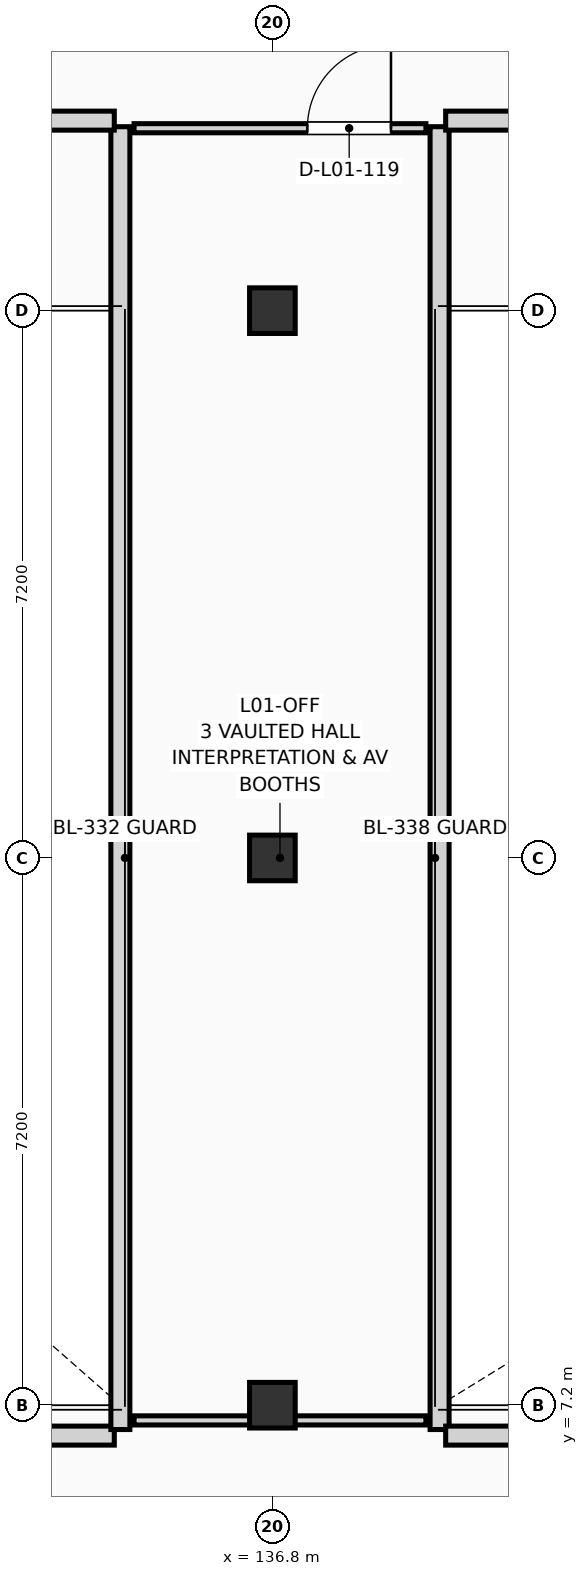
"""IFC4 building model, lengths in metres.
Left out: names, types, materials, properties, quantities, classifications, styles, units other than length and angle.
Written with IfcOpenShell. Run it as: python <this file> out.ifc"""

import sys

from ifc_helpers import new_model, si_unit, direction, frame, frame_2d, origin, origin_2d, place, context, subcontext, project, spatial, rectangle, extrude, element, fill, save


model = new_model("IFC4")
c1 = context("Model", 3, precision=1e-05, world=origin(), true_north=direction((0.0, 1.0)))
c2 = subcontext(c1, "Body", "Model", "MODEL_VIEW")
j1 = project(units=[si_unit("LENGTHUNIT", "METRE"), si_unit("PLANEANGLEUNIT", "RADIAN")], contexts=[c1])
p1 = place(None, origin())
s1 = spatial("IfcSite", under=j1, at=p1, CompositionType="ELEMENT")
p2 = place(p1, origin())
s2 = spatial("IfcBuilding", under=s1, at=p2, CompositionType="ELEMENT")
p3 = place(p2, frame((0.0, 0.0, 4.5)))
s3 = spatial("IfcBuildingStorey", under=s2, at=p3, CompositionType="ELEMENT", Elevation=4.5)
for number, where, z_axis, x_axis in (
    (1, (136.8, 7.2, 0.0), (0.0, 0.0, 1.0), (1.0, 0.0, 0.0)),
    (2, (136.8, 14.4, 0.0), (0.0, 0.0, 1.0), (1.0, 0.0, 0.0)),
    (3, (136.8, 21.6, 0.0), (0.0, 0.0, 1.0), (1.0, 0.0, 0.0)),
):
    element("IfcColumn", number, at=place(p3, frame(where, z_axis=z_axis, x_axis=x_axis)), inside=s3, PredefinedType="COLUMN", context=c2, shape_type="SweptSolid", body=[
        extrude(rectangle(XDim=0.6, YDim=0.6, at=origin_2d()), origin(), (0.0, 0.0, 1.0), 4.05),
    ])
p4 = place(p2, origin())
s4 = spatial("IfcBuildingStorey", under=s2, at=p4, CompositionType="ELEMENT", Elevation=0.0)
p5 = place(p4, frame((115.48, 6.8, 0.0), z_axis=(0.0, 0.0, 1.0), x_axis=(1.0, 0.0, 0.0)))
e4 = element("IfcWall", 4, at=p5, inside=s4, PredefinedType="PARTITIONING", context=c2, shape_type="SweptSolid", body=[
    extrude(rectangle(XDim=19.24, YDim=0.25, at=frame_2d((9.62, 0.0))), origin(), (0.0, 0.0, 1.0), 7.525),
])
p6 = place(p4, frame((134.8, 6.88, 0.0), z_axis=(0.0, 0.0, 1.0), x_axis=(0.0, 1.0, 0.0)))
e5 = element("IfcWall", 5, at=p6, inside=s4, PredefinedType="PARTITIONING", context=c2, shape_type="SweptSolid", body=[
    extrude(rectangle(XDim=17.14, YDim=0.25, at=frame_2d((8.57, 0.0))), origin(), (0.0, 0.0, 1.0), 8.185),
])
p7 = place(p4, frame((115.48, 24.1, 0.0), z_axis=(0.0, 0.0, 1.0), x_axis=(1.0, 0.0, 0.0)))
e6 = element("IfcWall", 6, at=p7, inside=s4, PredefinedType="PARTITIONING", context=c2, shape_type="SweptSolid", body=[
    extrude(rectangle(XDim=19.24, YDim=0.25, at=frame_2d((9.62, 0.0))), origin(), (0.0, 0.0, 1.0), 8.185),
])
p8 = place(p7, frame((8.72, 0.0, 0.0)))
e7 = element("IfcOpeningElement", 7, at=p8, cuts=e6, PredefinedType="OPENING", context=c2, shape_type="SweptSolid", body=[
    extrude(rectangle(XDim=1.8, YDim=2.3, at=frame_2d((0.9, 1.15))), frame((0.0, 0.137, 0.0), z_axis=(0.0, -1.0, 0.0), x_axis=(1.0, 0.0, 0.0)), (0.0, 0.0, 1.0), 0.274),
])
p9 = place(p4, frame((139.0, 6.88, 0.0), z_axis=(0.0, 0.0, 1.0), x_axis=(0.0, 1.0, 0.0)))
e8 = element("IfcWall", 8, at=p9, inside=s4, PredefinedType="PARTITIONING", context=c2, shape_type="SweptSolid", body=[
    extrude(rectangle(XDim=17.14, YDim=0.25, at=frame_2d((8.57, 0.0))), origin(), (0.0, 0.0, 1.0), 8.185),
])
p10 = place(p4, frame((139.08, 6.8, 0.0), z_axis=(0.0, 0.0, 1.0), x_axis=(1.0, 0.0, 0.0)))
e9 = element("IfcWall", 9, at=p10, inside=s4, PredefinedType="PARTITIONING", context=c2, shape_type="SweptSolid", body=[
    extrude(rectangle(XDim=23.24, YDim=0.25, at=frame_2d((11.62, 0.0))), origin(), (0.0, 0.0, 1.0), 7.525),
])
p11 = place(p4, frame((139.08, 24.1, 0.0), z_axis=(0.0, 0.0, 1.0), x_axis=(1.0, 0.0, 0.0)))
e10 = element("IfcWall", 10, at=p11, inside=s4, PredefinedType="PARTITIONING", context=c2, shape_type="SweptSolid", body=[
    extrude(rectangle(XDim=23.24, YDim=0.25, at=frame_2d((11.62, 0.0))), origin(), (0.0, 0.0, 1.0), 8.185),
])
p12 = place(p11, frame((10.282, 0.0, 0.0)))
e11 = element("IfcOpeningElement", 11, at=p12, cuts=e10, PredefinedType="OPENING", context=c2, shape_type="SweptSolid", body=[
    extrude(rectangle(XDim=1.8, YDim=2.3, at=frame_2d((0.9, 1.15))), frame((0.0, 0.137, 0.0), z_axis=(0.0, -1.0, 0.0), x_axis=(1.0, 0.0, 0.0)), (0.0, 0.0, 1.0), 0.274),
])
p13 = place(p3, frame((134.98, 7.0, 0.0), z_axis=(0.0, 0.0, 1.0), x_axis=(1.0, 0.0, 0.0)))
e12 = element("IfcWall", 12, at=p13, inside=s3, PredefinedType="PARTITIONING", context=c2, shape_type="SweptSolid", body=[
    extrude(rectangle(XDim=3.84, YDim=0.12, at=frame_2d((1.92, 0.0))), origin(), (0.0, 0.0, 1.0), 3.025),
])
p14 = place(p3, frame((134.98, 24.0, 0.0), z_axis=(0.0, 0.0, 1.0), x_axis=(1.0, 0.0, 0.0)))
e13 = element("IfcWall", 13, at=p14, inside=s3, PredefinedType="PARTITIONING", context=c2, shape_type="SweptSolid", body=[
    extrude(rectangle(XDim=3.84, YDim=0.12, at=frame_2d((1.92, 0.0))), origin(), (0.0, 0.0, 1.0), 3.775),
])
p15 = place(p14, frame((2.281, 0.0, 0.0)))
e14 = element("IfcOpeningElement", 14, at=p15, cuts=e13, PredefinedType="OPENING", context=c2, shape_type="SweptSolid", body=[
    extrude(rectangle(XDim=1.1, YDim=2.15, at=frame_2d((0.55, 1.075))), frame((0.0, 0.072, 0.0), z_axis=(0.0, -1.0, 0.0), x_axis=(1.0, 0.0, 0.0)), (0.0, 0.0, 1.0), 0.144),
])
p16 = place(p15, origin())
e15 = element("IfcDoor", 15, at=p16, inside=s3, OperationType="SINGLE_SWING_RIGHT", PredefinedType="DOOR", context=c2, shape_type="SweptSolid", body=[
    extrude(rectangle(XDim=1.1, YDim=2.15, at=frame_2d((0.55, 1.075))), frame((0.0, 0.025, 0.0), z_axis=(0.0, -1.0, 0.0), x_axis=(1.0, 0.0, 0.0)), (0.0, 0.0, 1.0), 0.05),
])
fill(e14, e15)
save(model, sys.argv[1])
